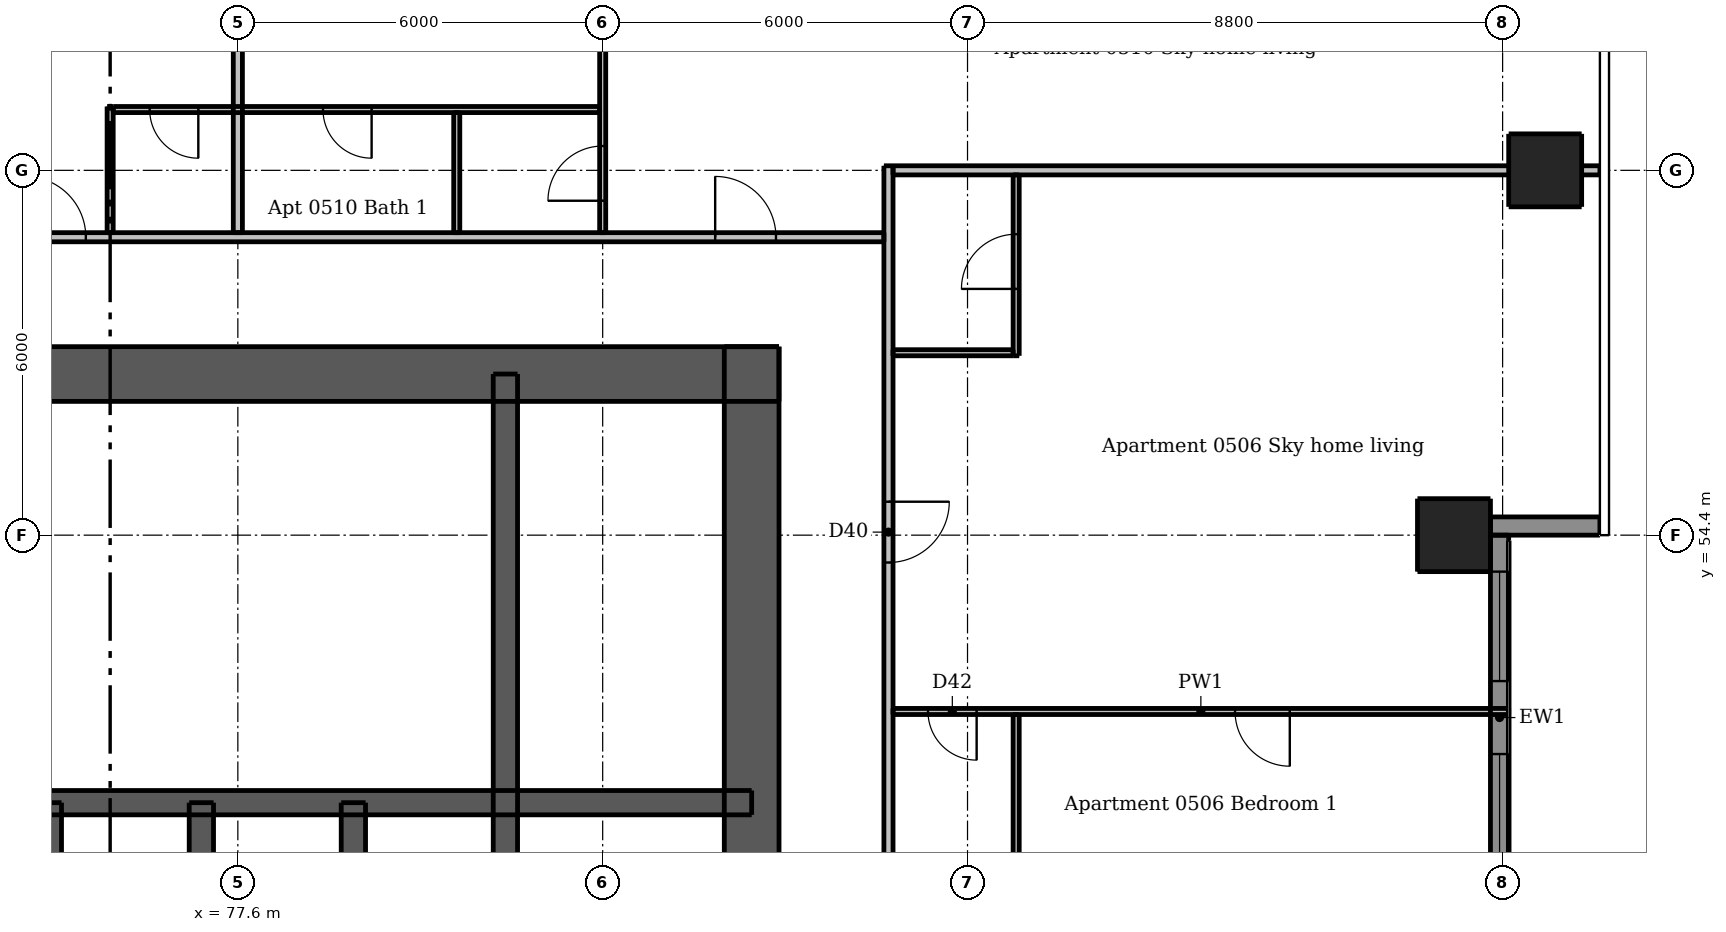
"""IFC4 building model, lengths in metres.
Left out: names, types, materials, properties, quantities, classifications, styles, units other than length and angle.
Written with IfcOpenShell. Run it as: python <this file> out.ifc"""

import sys

from ifc_helpers import new_model, si_unit, direction, frame, frame_2d, origin, origin_2d, place, context, subcontext, project, spatial, rectangle, extrude, element, fill, save


model = new_model("IFC4")
c1 = context("Model", 3, precision=1e-05, world=origin(), true_north=direction((0.0, 1.0)))
c2 = subcontext(c1, "Body", "Model", "MODEL_VIEW")
j1 = project(units=[si_unit("LENGTHUNIT", "METRE"), si_unit("PLANEANGLEUNIT", "RADIAN")], contexts=[c1])
p1 = place(None, origin())
s1 = spatial("IfcSite", under=j1, at=p1, CompositionType="ELEMENT")
p2 = place(p1, origin())
s2 = spatial("IfcBuilding", under=s1, at=p2, CompositionType="ELEMENT")
p3 = place(p2, frame((0.0, 0.0, 23.5)))
s3 = spatial("IfcBuildingStorey", under=s2, at=p3, CompositionType="ELEMENT", Elevation=23.5)
p4 = place(p3, frame((62.5, 57.05, 0.0), z_axis=(0.0, 0.0, 1.0), x_axis=(1.0, 0.0, 0.0)))
e1 = element("IfcWall", 1, at=p4, inside=s3, PredefinedType="SHEAR", context=c2, shape_type="SweptSolid", body=[
    extrude(rectangle(XDim=24.0, YDim=0.9, at=frame_2d((12.0, 0.0))), origin(), (0.0, 0.0, 1.0), 3.05),
])
p5 = place(p4, frame((20.85, 0.0, 0.0)))
e2 = element("IfcOpeningElement", 2, at=p5, cuts=e1, PredefinedType="OPENING", context=c2, shape_type="SweptSolid", body=[
    extrude(rectangle(XDim=1.1, YDim=2.1, at=frame_2d((0.55, 1.05))), frame((0.0, 0.46, 0.0), z_axis=(0.0, -1.0, 0.0), x_axis=(1.0, 0.0, 0.0)), (0.0, 0.0, 1.0), 0.92),
])
p6 = place(p4, frame((2.05, 0.0, 0.0)))
e3 = element("IfcOpeningElement", 3, at=p6, cuts=e1, PredefinedType="OPENING", context=c2, shape_type="SweptSolid", body=[
    extrude(rectangle(XDim=1.1, YDim=2.1, at=frame_2d((0.55, 1.05))), frame((0.0, 0.46, 0.0), z_axis=(0.0, -1.0, 0.0), x_axis=(1.0, 0.0, 0.0)), (0.0, 0.0, 1.0), 0.92),
])
p7 = place(p4, frame((6.44, 0.0, 0.0)))
e4 = element("IfcOpeningElement", 4, at=p7, cuts=e1, PredefinedType="OPENING", context=c2, shape_type="SweptSolid", body=[
    extrude(rectangle(XDim=0.9, YDim=2.1, at=frame_2d((0.45, 1.05))), frame((0.0, 0.46, 0.0), z_axis=(0.0, -1.0, 0.0), x_axis=(1.0, 0.0, 0.0)), (0.0, 0.0, 1.0), 0.92),
])
p8 = place(p4, frame((13.74, 0.0, 0.0)))
e5 = element("IfcOpeningElement", 5, at=p8, cuts=e1, PredefinedType="OPENING", context=c2, shape_type="SweptSolid", body=[
    extrude(rectangle(XDim=0.9, YDim=2.1, at=frame_2d((0.45, 1.05))), frame((0.0, 0.46, 0.0), z_axis=(0.0, -1.0, 0.0), x_axis=(1.0, 0.0, 0.0)), (0.0, 0.0, 1.0), 0.92),
])
p9 = place(p3, frame((86.05, 33.5, 0.0), z_axis=(0.0, 0.0, 1.0), x_axis=(0.0, 1.0, 0.0)))
e6 = element("IfcWall", 6, at=p9, inside=s3, PredefinedType="SHEAR", context=c2, shape_type="SweptSolid", body=[
    extrude(rectangle(XDim=24.0, YDim=0.9, at=frame_2d((12.0, 0.0))), origin(), (0.0, 0.0, 1.0), 3.05),
])
p10 = place(p9, frame((11.2, 0.0, 0.0)))
e7 = element("IfcOpeningElement", 7, at=p10, cuts=e6, PredefinedType="OPENING", context=c2, shape_type="SweptSolid", body=[
    extrude(rectangle(XDim=1.6, YDim=2.1, at=frame_2d((0.8, 1.05))), frame((0.0, 0.46, 0.0), z_axis=(0.0, -1.0, 0.0), x_axis=(1.0, 0.0, 0.0)), (0.0, 0.0, 1.0), 0.92),
])
p11 = place(p3, frame((62.95, 50.0, 0.0), z_axis=(0.0, 0.0, 1.0), x_axis=(1.0, 0.0, 0.0)))
e8 = element("IfcWall", 8, at=p11, inside=s3, PredefinedType="SHEAR", context=c2, shape_type="SweptSolid", body=[
    extrude(rectangle(XDim=23.1, YDim=0.4, at=frame_2d((11.55, 0.0))), origin(), (0.0, 0.0, 1.0), 3.05),
])
p12 = place(p3, frame((82.0, 47.1, 0.0), z_axis=(0.0, 0.0, 1.0), x_axis=(0.0, 1.0, 0.0)))
e9 = element("IfcWall", 9, at=p12, inside=s3, PredefinedType="SHEAR", context=c2, shape_type="SweptSolid", body=[
    extrude(rectangle(XDim=9.95, YDim=0.4, at=frame_2d((4.975, 0.0))), origin(), (0.0, 0.0, 1.0), 3.05),
])
for number, where, z_axis, x_axis in (
    (10, (74.5, 47.1, 0.0), (0.0, 0.0, 1.0), (0.0, 1.0, 0.0)),
    (11, (77.0, 47.1, 0.0), (0.0, 0.0, 1.0), (0.0, 1.0, 0.0)),
    (12, (79.5, 47.1, 0.0), (0.0, 0.0, 1.0), (0.0, 1.0, 0.0)),
):
    element("IfcWall", number, at=place(p3, frame(where, z_axis=z_axis, x_axis=x_axis)), inside=s3, PredefinedType="SHEAR", context=c2, shape_type="SweptSolid", body=[
        extrude(rectangle(XDim=2.9, YDim=0.4, at=frame_2d((1.45, 0.0))), origin(), (0.0, 0.0, 1.0), 3.05),
    ])
for number, where, z_axis, x_axis in (
    (13, (97.6, 54.4, 0.0), (0.0, 0.0, 1.0), (1.0, 0.0, 0.0)),
    (14, (99.1, 60.4, 0.0), (0.0, 0.0, 1.0), (1.0, 0.0, 0.0)),
):
    element("IfcColumn", number, at=place(p3, frame(where, z_axis=z_axis, x_axis=x_axis)), inside=s3, PredefinedType="COLUMN", context=c2, shape_type="SweptSolid", body=[
        extrude(rectangle(XDim=1.2, YDim=1.2, at=origin_2d()), origin(), (0.0, 0.0, 1.0), 3.05),
    ])
p13 = place(p3, frame((98.2, 54.55, 0.0), z_axis=(0.0, 0.0, 1.0), x_axis=(1.0, 0.0, 0.0)))
e15 = element("IfcWall", 15, at=p13, inside=s3, PredefinedType="SOLIDWALL", context=c2, shape_type="SweptSolid", body=[
    extrude(rectangle(XDim=1.8, YDim=0.3, at=frame_2d((0.9, 0.0))), origin(), (0.0, 0.0, 1.0), 3.05),
])
p14 = place(p3, frame((98.35, 48.4, 0.0), z_axis=(0.0, 0.0, 1.0), x_axis=(0.0, 1.0, 0.0)))
e16 = element("IfcWall", 16, at=p14, inside=s3, PredefinedType="SOLIDWALL", context=c2, shape_type="SweptSolid", body=[
    extrude(rectangle(XDim=6.0, YDim=0.3, at=frame_2d((3.0, 0.0))), origin(), (0.0, 0.0, 1.0), 3.05),
])
p15 = place(p14, frame((0.6, 0.0, 0.15)))
e17 = element("IfcOpeningElement", 17, at=p15, cuts=e16, PredefinedType="OPENING", context=c2, shape_type="SweptSolid", body=[
    extrude(rectangle(XDim=1.8, YDim=2.1, at=frame_2d((0.9, 1.05))), frame((0.0, 0.16, 0.0), z_axis=(0.0, -1.0, 0.0), x_axis=(1.0, 0.0, 0.0)), (0.0, 0.0, 1.0), 0.32),
])
p16 = place(p14, frame((3.6, 0.0, 0.15)))
e18 = element("IfcOpeningElement", 18, at=p16, cuts=e16, PredefinedType="OPENING", context=c2, shape_type="SweptSolid", body=[
    extrude(rectangle(XDim=1.8, YDim=2.1, at=frame_2d((0.9, 1.05))), frame((0.0, 0.16, 0.0), z_axis=(0.0, -1.0, 0.0), x_axis=(1.0, 0.0, 0.0)), (0.0, 0.0, 1.0), 0.32),
])
p17 = place(p3, frame((75.5, 59.375, 0.0), z_axis=(0.0, 0.0, 1.0), x_axis=(0.0, 1.0, 0.0)))
e19 = element("IfcWall", 19, at=p17, inside=s3, PredefinedType="PARTITIONING", context=c2, shape_type="SweptSolid", body=[
    extrude(rectangle(XDim=2.075, YDim=0.1, at=frame_2d((1.038, 0.0))), origin(), (0.0, 0.0, 1.0), 3.05),
])
p18 = place(p3, frame((81.2, 59.375, 0.0), z_axis=(0.0, 0.0, 1.0), x_axis=(0.0, 1.0, 0.0)))
e20 = element("IfcWall", 20, at=p18, inside=s3, PredefinedType="PARTITIONING", context=c2, shape_type="SweptSolid", body=[
    extrude(rectangle(XDim=1.975, YDim=0.1, at=frame_2d((0.988, 0.0))), origin(), (0.0, 0.0, 1.0), 3.05),
])
p19 = place(p3, frame((83.6, 59.375, 0.0), z_axis=(0.0, 0.0, 1.0), x_axis=(0.0, 1.0, 0.0)))
e21 = element("IfcWall", 21, at=p19, inside=s3, PredefinedType="PARTITIONING", context=c2, shape_type="SweptSolid", body=[
    extrude(rectangle(XDim=8.625, YDim=0.1, at=frame_2d((4.312, 0.0))), origin(), (0.0, 0.0, 1.0), 2.516),
])
p20 = place(p19, frame((0.525, 0.0, 0.0)))
e22 = element("IfcOpeningElement", 22, at=p20, cuts=e21, PredefinedType="OPENING", context=c2, shape_type="SweptSolid", body=[
    extrude(rectangle(XDim=0.9, YDim=2.1, at=frame_2d((0.45, 1.05))), frame((0.0, 0.06, 0.0), z_axis=(0.0, -1.0, 0.0), x_axis=(1.0, 0.0, 0.0)), (0.0, 0.0, 1.0), 0.12),
])
p21 = place(p19, frame((4.875, 0.0, 0.0)))
e23 = element("IfcOpeningElement", 23, at=p21, cuts=e21, PredefinedType="OPENING", context=c2, shape_type="SweptSolid", body=[
    extrude(rectangle(XDim=0.9, YDim=2.1, at=frame_2d((0.45, 1.05))), frame((0.0, 0.06, 0.0), z_axis=(0.0, -1.0, 0.0), x_axis=(1.0, 0.0, 0.0)), (0.0, 0.0, 1.0), 0.12),
])
p22 = place(p3, frame((90.4, 48.5, 0.0), z_axis=(0.0, 0.0, 1.0), x_axis=(0.0, 1.0, 0.0)))
e24 = element("IfcWall", 24, at=p22, inside=s3, PredefinedType="PARTITIONING", context=c2, shape_type="SweptSolid", body=[
    extrude(rectangle(XDim=2.95, YDim=0.1, at=frame_2d((1.475, 0.0))), origin(), (0.0, 0.0, 1.0), 3.05),
])
p23 = place(p3, frame((90.4, 57.35, 0.0), z_axis=(0.0, 0.0, 1.0), x_axis=(0.0, 1.0, 0.0)))
e25 = element("IfcWall", 25, at=p23, inside=s3, PredefinedType="PARTITIONING", context=c2, shape_type="SweptSolid", body=[
    extrude(rectangle(XDim=2.975, YDim=0.1, at=frame_2d((1.487, 0.0))), origin(), (0.0, 0.0, 1.0), 3.05),
])
p24 = place(p23, frame((1.1, 0.0, 0.0)))
e26 = element("IfcOpeningElement", 26, at=p24, cuts=e25, PredefinedType="OPENING", context=c2, shape_type="SweptSolid", body=[
    extrude(rectangle(XDim=0.9, YDim=2.1, at=frame_2d((0.45, 1.05))), frame((0.0, 0.06, 0.0), z_axis=(0.0, -1.0, 0.0), x_axis=(1.0, 0.0, 0.0)), (0.0, 0.0, 1.0), 0.12),
])
p25 = place(p3, frame((83.55, 61.4, 0.0), z_axis=(0.0, 0.0, 1.0), x_axis=(-1.0, 0.0, 0.0)))
e27 = element("IfcWall", 27, at=p25, inside=s3, PredefinedType="PARTITIONING", context=c2, shape_type="SweptSolid", body=[
    extrude(rectangle(XDim=8.0, YDim=0.1, at=frame_2d((4.0, 0.0))), origin(), (0.0, 0.0, 1.0), 3.05),
])
p26 = place(p25, frame((6.6, 0.0, 0.0)))
e28 = element("IfcOpeningElement", 28, at=p26, cuts=e27, PredefinedType="OPENING", context=c2, shape_type="SweptSolid", body=[
    extrude(rectangle(XDim=0.8, YDim=2.1, at=frame_2d((0.4, 1.05))), frame((0.0, 0.06, 0.0), z_axis=(0.0, -1.0, 0.0), x_axis=(1.0, 0.0, 0.0)), (0.0, 0.0, 1.0), 0.12),
])
p27 = place(p25, frame((3.75, 0.0, 0.0)))
e29 = element("IfcOpeningElement", 29, at=p27, cuts=e27, PredefinedType="OPENING", context=c2, shape_type="SweptSolid", body=[
    extrude(rectangle(XDim=0.8, YDim=2.1, at=frame_2d((0.4, 1.05))), frame((0.0, 0.06, 0.0), z_axis=(0.0, -1.0, 0.0), x_axis=(1.0, 0.0, 0.0)), (0.0, 0.0, 1.0), 0.12),
])
p28 = place(p3, frame((88.375, 57.4, 0.0), z_axis=(0.0, 0.0, 1.0), x_axis=(1.0, 0.0, 0.0)))
e30 = element("IfcWall", 30, at=p28, inside=s3, PredefinedType="PARTITIONING", context=c2, shape_type="SweptSolid", body=[
    extrude(rectangle(XDim=1.975, YDim=0.1, at=frame_2d((0.988, 0.0))), origin(), (0.0, 0.0, 1.0), 3.05),
])
p29 = place(p3, frame((98.5, 51.5, 0.0), z_axis=(0.0, 0.0, 1.0), x_axis=(-1.0, 0.0, 0.0)))
e31 = element("IfcWall", 31, at=p29, inside=s3, PredefinedType="PARTITIONING", context=c2, shape_type="SweptSolid", body=[
    extrude(rectangle(XDim=10.125, YDim=0.1, at=frame_2d((5.062, 0.0))), origin(), (0.0, 0.0, 1.0), 3.05),
])
p30 = place(p29, frame((3.6, 0.0, 0.0)))
e32 = element("IfcOpeningElement", 32, at=p30, cuts=e31, PredefinedType="OPENING", context=c2, shape_type="SweptSolid", body=[
    extrude(rectangle(XDim=0.9, YDim=2.1, at=frame_2d((0.45, 1.05))), frame((0.0, 0.06, 0.0), z_axis=(0.0, -1.0, 0.0), x_axis=(1.0, 0.0, 0.0)), (0.0, 0.0, 1.0), 0.12),
])
p31 = place(p29, frame((8.75, 0.0, 0.0)))
e33 = element("IfcOpeningElement", 33, at=p31, cuts=e31, PredefinedType="OPENING", context=c2, shape_type="SweptSolid", body=[
    extrude(rectangle(XDim=0.8, YDim=2.1, at=frame_2d((0.4, 1.05))), frame((0.0, 0.06, 0.0), z_axis=(0.0, -1.0, 0.0), x_axis=(1.0, 0.0, 0.0)), (0.0, 0.0, 1.0), 0.12),
])
p32 = place(p3, frame((77.6, 59.375, 0.0), z_axis=(0.0, 0.0, 1.0), x_axis=(0.0, 1.0, 0.0)))
e34 = element("IfcWall", 34, at=p32, inside=s3, PredefinedType="PARTITIONING", context=c2, shape_type="SweptSolid", body=[
    extrude(rectangle(XDim=8.625, YDim=0.15, at=frame_2d((4.312, 0.0))), origin(), (0.0, 0.0, 1.0), 2.516),
])
p33 = place(p3, frame((88.3, 60.475, 0.0), z_axis=(0.0, 0.0, 1.0), x_axis=(0.0, -1.0, 0.0)))
e35 = element("IfcWall", 35, at=p33, inside=s3, PredefinedType="PARTITIONING", context=c2, shape_type="SweptSolid", body=[
    extrude(rectangle(XDim=28.7, YDim=0.15, at=frame_2d((14.35, 0.0))), origin(), (0.0, 0.0, 1.0), 3.05),
])
p34 = place(p33, frame((27.425, 0.0, 0.0)))
e36 = element("IfcOpeningElement", 36, at=p34, cuts=e35, PredefinedType="OPENING", context=c2, shape_type="SweptSolid", body=[
    extrude(rectangle(XDim=1.0, YDim=2.1, at=frame_2d((0.5, 1.05))), frame((0.0, 0.085, 0.0), z_axis=(0.0, -1.0, 0.0), x_axis=(1.0, 0.0, 0.0)), (0.0, 0.0, 1.0), 0.17),
])
p35 = place(p33, frame((16.325, 0.0, 0.0)))
e37 = element("IfcOpeningElement", 37, at=p35, cuts=e35, PredefinedType="OPENING", context=c2, shape_type="SweptSolid", body=[
    extrude(rectangle(XDim=1.0, YDim=2.1, at=frame_2d((0.5, 1.05))), frame((0.0, 0.085, 0.0), z_axis=(0.0, -1.0, 0.0), x_axis=(1.0, 0.0, 0.0)), (0.0, 0.0, 1.0), 0.17),
])
p36 = place(p33, frame((5.525, 0.0, 0.0)))
e38 = element("IfcOpeningElement", 38, at=p36, cuts=e35, PredefinedType="OPENING", context=c2, shape_type="SweptSolid", body=[
    extrude(rectangle(XDim=1.0, YDim=2.1, at=frame_2d((0.5, 1.05))), frame((0.0, 0.085, 0.0), z_axis=(0.0, -1.0, 0.0), x_axis=(1.0, 0.0, 0.0)), (0.0, 0.0, 1.0), 0.17),
])
p37 = place(p3, frame((88.375, 60.4, 0.0), z_axis=(0.0, 0.0, 1.0), x_axis=(1.0, 0.0, 0.0)))
e39 = element("IfcWall", 39, at=p37, inside=s3, PredefinedType="PARTITIONING", context=c2, shape_type="SweptSolid", body=[
    extrude(rectangle(XDim=11.625, YDim=0.15, at=frame_2d((5.812, 0.0))), origin(), (0.0, 0.0, 1.0), 2.516),
])
p38 = place(p3, frame((59.675, 59.3, 0.0), z_axis=(0.0, 0.0, 1.0), x_axis=(1.0, 0.0, 0.0)))
e40 = element("IfcWall", 40, at=p38, inside=s3, PredefinedType="PARTITIONING", context=c2, shape_type="SweptSolid", body=[
    extrude(rectangle(XDim=28.55, YDim=0.15, at=frame_2d((14.275, 0.0))), origin(), (0.0, 0.0, 1.0), 3.05),
])
p39 = place(p38, frame((2.425, 0.0, 0.0)))
e41 = element("IfcOpeningElement", 41, at=p39, cuts=e40, PredefinedType="OPENING", context=c2, shape_type="SweptSolid", body=[
    extrude(rectangle(XDim=1.0, YDim=2.1, at=frame_2d((0.5, 1.05))), frame((0.0, 0.085, 0.0), z_axis=(0.0, -1.0, 0.0), x_axis=(1.0, 0.0, 0.0)), (0.0, 0.0, 1.0), 0.17),
])
p40 = place(p38, frame((8.425, 0.0, 0.0)))
e42 = element("IfcOpeningElement", 42, at=p40, cuts=e40, PredefinedType="OPENING", context=c2, shape_type="SweptSolid", body=[
    extrude(rectangle(XDim=1.0, YDim=2.1, at=frame_2d((0.5, 1.05))), frame((0.0, 0.085, 0.0), z_axis=(0.0, -1.0, 0.0), x_axis=(1.0, 0.0, 0.0)), (0.0, 0.0, 1.0), 0.17),
])
p41 = place(p38, frame((14.425, 0.0, 0.0)))
e43 = element("IfcOpeningElement", 43, at=p41, cuts=e40, PredefinedType="OPENING", context=c2, shape_type="SweptSolid", body=[
    extrude(rectangle(XDim=1.0, YDim=2.1, at=frame_2d((0.5, 1.05))), frame((0.0, 0.085, 0.0), z_axis=(0.0, -1.0, 0.0), x_axis=(1.0, 0.0, 0.0)), (0.0, 0.0, 1.0), 0.17),
])
p42 = place(p38, frame((25.775, 0.0, 0.0)))
e44 = element("IfcOpeningElement", 44, at=p42, cuts=e40, PredefinedType="OPENING", context=c2, shape_type="SweptSolid", body=[
    extrude(rectangle(XDim=1.0, YDim=2.1, at=frame_2d((0.5, 1.05))), frame((0.0, 0.085, 0.0), z_axis=(0.0, -1.0, 0.0), x_axis=(1.0, 0.0, 0.0)), (0.0, 0.0, 1.0), 0.17),
])
p43 = place(p15, origin())
e45 = element("IfcWindow", 45, at=p43, inside=s3, PartitioningType="DOUBLE_PANEL_VERTICAL", PredefinedType="WINDOW", context=c2, shape_type="SweptSolid", body=[
    extrude(rectangle(XDim=1.8, YDim=2.1, at=frame_2d((0.9, 1.05))), frame((0.0, 0.03, 0.0), z_axis=(0.0, -1.0, 0.0), x_axis=(1.0, 0.0, 0.0)), (0.0, 0.0, 1.0), 0.06),
])
fill(e17, e45)
p44 = place(p16, origin())
e46 = element("IfcWindow", 46, at=p44, inside=s3, PartitioningType="DOUBLE_PANEL_VERTICAL", PredefinedType="WINDOW", context=c2, shape_type="SweptSolid", body=[
    extrude(rectangle(XDim=1.8, YDim=2.1, at=frame_2d((0.9, 1.05))), frame((0.0, 0.03, 0.0), z_axis=(0.0, -1.0, 0.0), x_axis=(1.0, 0.0, 0.0)), (0.0, 0.0, 1.0), 0.06),
])
fill(e18, e46)
p45 = place(p5, origin())
e47 = element("IfcDoor", 47, at=p45, inside=s3, OperationType="SINGLE_SWING_RIGHT", PredefinedType="DOOR", context=c2, shape_type="SweptSolid", body=[
    extrude(rectangle(XDim=1.1, YDim=2.1, at=frame_2d((0.55, 1.05))), frame((0.0, -0.388, 0.0), z_axis=(0.0, -1.0, 0.0), x_axis=(1.0, 0.0, 0.0)), (0.0, 0.0, 1.0), 0.05),
])
fill(e2, e47)
p46 = place(p8, origin())
e48 = element("IfcDoor", 48, at=p46, inside=s3, OperationType="SINGLE_SWING_RIGHT", PredefinedType="DOOR", context=c2, shape_type="SweptSolid", body=[
    extrude(rectangle(XDim=0.9, YDim=2.1, at=frame_2d((0.45, 1.05))), frame((0.0, -0.388, 0.0), z_axis=(0.0, -1.0, 0.0), x_axis=(1.0, 0.0, 0.0)), (0.0, 0.0, 1.0), 0.05),
])
fill(e5, e48)
p47 = place(p36, origin())
e49 = element("IfcDoor", 49, at=p47, inside=s3, OperationType="SINGLE_SWING_LEFT", PredefinedType="DOOR", context=c2, shape_type="SweptSolid", body=[
    extrude(rectangle(XDim=1.0, YDim=2.1, at=frame_2d((0.5, 1.05))), frame((0.0, 0.025, 0.0), z_axis=(0.0, -1.0, 0.0), x_axis=(1.0, 0.0, 0.0)), (0.0, 0.0, 1.0), 0.05),
])
fill(e38, e49)
p48 = place(p24, origin())
e50 = element("IfcDoor", 50, at=p48, inside=s3, OperationType="SINGLE_SWING_LEFT", PredefinedType="DOOR", context=c2, shape_type="SweptSolid", body=[
    extrude(rectangle(XDim=0.9, YDim=2.1, at=frame_2d((0.45, 1.05))), frame((0.0, 0.025, 0.0), z_axis=(0.0, -1.0, 0.0), x_axis=(1.0, 0.0, 0.0)), (0.0, 0.0, 1.0), 0.05),
])
fill(e26, e50)
p49 = place(p30, origin())
e51 = element("IfcDoor", 51, at=p49, inside=s3, OperationType="SINGLE_SWING_LEFT", PredefinedType="DOOR", context=c2, shape_type="SweptSolid", body=[
    extrude(rectangle(XDim=0.9, YDim=2.1, at=frame_2d((0.45, 1.05))), frame((0.0, 0.025, 0.0), z_axis=(0.0, -1.0, 0.0), x_axis=(1.0, 0.0, 0.0)), (0.0, 0.0, 1.0), 0.05),
])
fill(e32, e51)
p50 = place(p31, origin())
e52 = element("IfcDoor", 52, at=p50, inside=s3, OperationType="SINGLE_SWING_LEFT", PredefinedType="DOOR", context=c2, shape_type="SweptSolid", body=[
    extrude(rectangle(XDim=0.8, YDim=2.1, at=frame_2d((0.4, 1.05))), frame((0.0, 0.025, 0.0), z_axis=(0.0, -1.0, 0.0), x_axis=(1.0, 0.0, 0.0)), (0.0, 0.0, 1.0), 0.05),
])
fill(e33, e52)
p51 = place(p41, origin())
e53 = element("IfcDoor", 53, at=p51, inside=s3, OperationType="SINGLE_SWING_LEFT", PredefinedType="DOOR", context=c2, shape_type="SweptSolid", body=[
    extrude(rectangle(XDim=1.0, YDim=2.1, at=frame_2d((0.5, 1.05))), frame((0.0, 0.025, 0.0), z_axis=(0.0, -1.0, 0.0), x_axis=(1.0, 0.0, 0.0)), (0.0, 0.0, 1.0), 0.05),
])
fill(e43, e53)
p52 = place(p26, origin())
e54 = element("IfcDoor", 54, at=p52, inside=s3, OperationType="SINGLE_SWING_LEFT", PredefinedType="DOOR", context=c2, shape_type="SweptSolid", body=[
    extrude(rectangle(XDim=0.8, YDim=2.1, at=frame_2d((0.4, 1.05))), frame((0.0, 0.025, 0.0), z_axis=(0.0, -1.0, 0.0), x_axis=(1.0, 0.0, 0.0)), (0.0, 0.0, 1.0), 0.05),
])
fill(e28, e54)
p53 = place(p42, origin())
e55 = element("IfcDoor", 55, at=p53, inside=s3, OperationType="SINGLE_SWING_LEFT", PredefinedType="DOOR", context=c2, shape_type="SweptSolid", body=[
    extrude(rectangle(XDim=1.0, YDim=2.1, at=frame_2d((0.5, 1.05))), frame((0.0, 0.025, 0.0), z_axis=(0.0, -1.0, 0.0), x_axis=(1.0, 0.0, 0.0)), (0.0, 0.0, 1.0), 0.05),
])
fill(e44, e55)
p54 = place(p20, origin())
e56 = element("IfcDoor", 56, at=p54, inside=s3, OperationType="SINGLE_SWING_LEFT", PredefinedType="DOOR", context=c2, shape_type="SweptSolid", body=[
    extrude(rectangle(XDim=0.9, YDim=2.1, at=frame_2d((0.45, 1.05))), frame((0.0, 0.025, 0.0), z_axis=(0.0, -1.0, 0.0), x_axis=(1.0, 0.0, 0.0)), (0.0, 0.0, 1.0), 0.05),
])
fill(e22, e56)
p55 = place(p27, origin())
e57 = element("IfcDoor", 57, at=p55, inside=s3, OperationType="SINGLE_SWING_LEFT", PredefinedType="DOOR", context=c2, shape_type="SweptSolid", body=[
    extrude(rectangle(XDim=0.8, YDim=2.1, at=frame_2d((0.4, 1.05))), frame((0.0, 0.025, 0.0), z_axis=(0.0, -1.0, 0.0), x_axis=(1.0, 0.0, 0.0)), (0.0, 0.0, 1.0), 0.05),
])
fill(e29, e57)
save(model, sys.argv[1])
